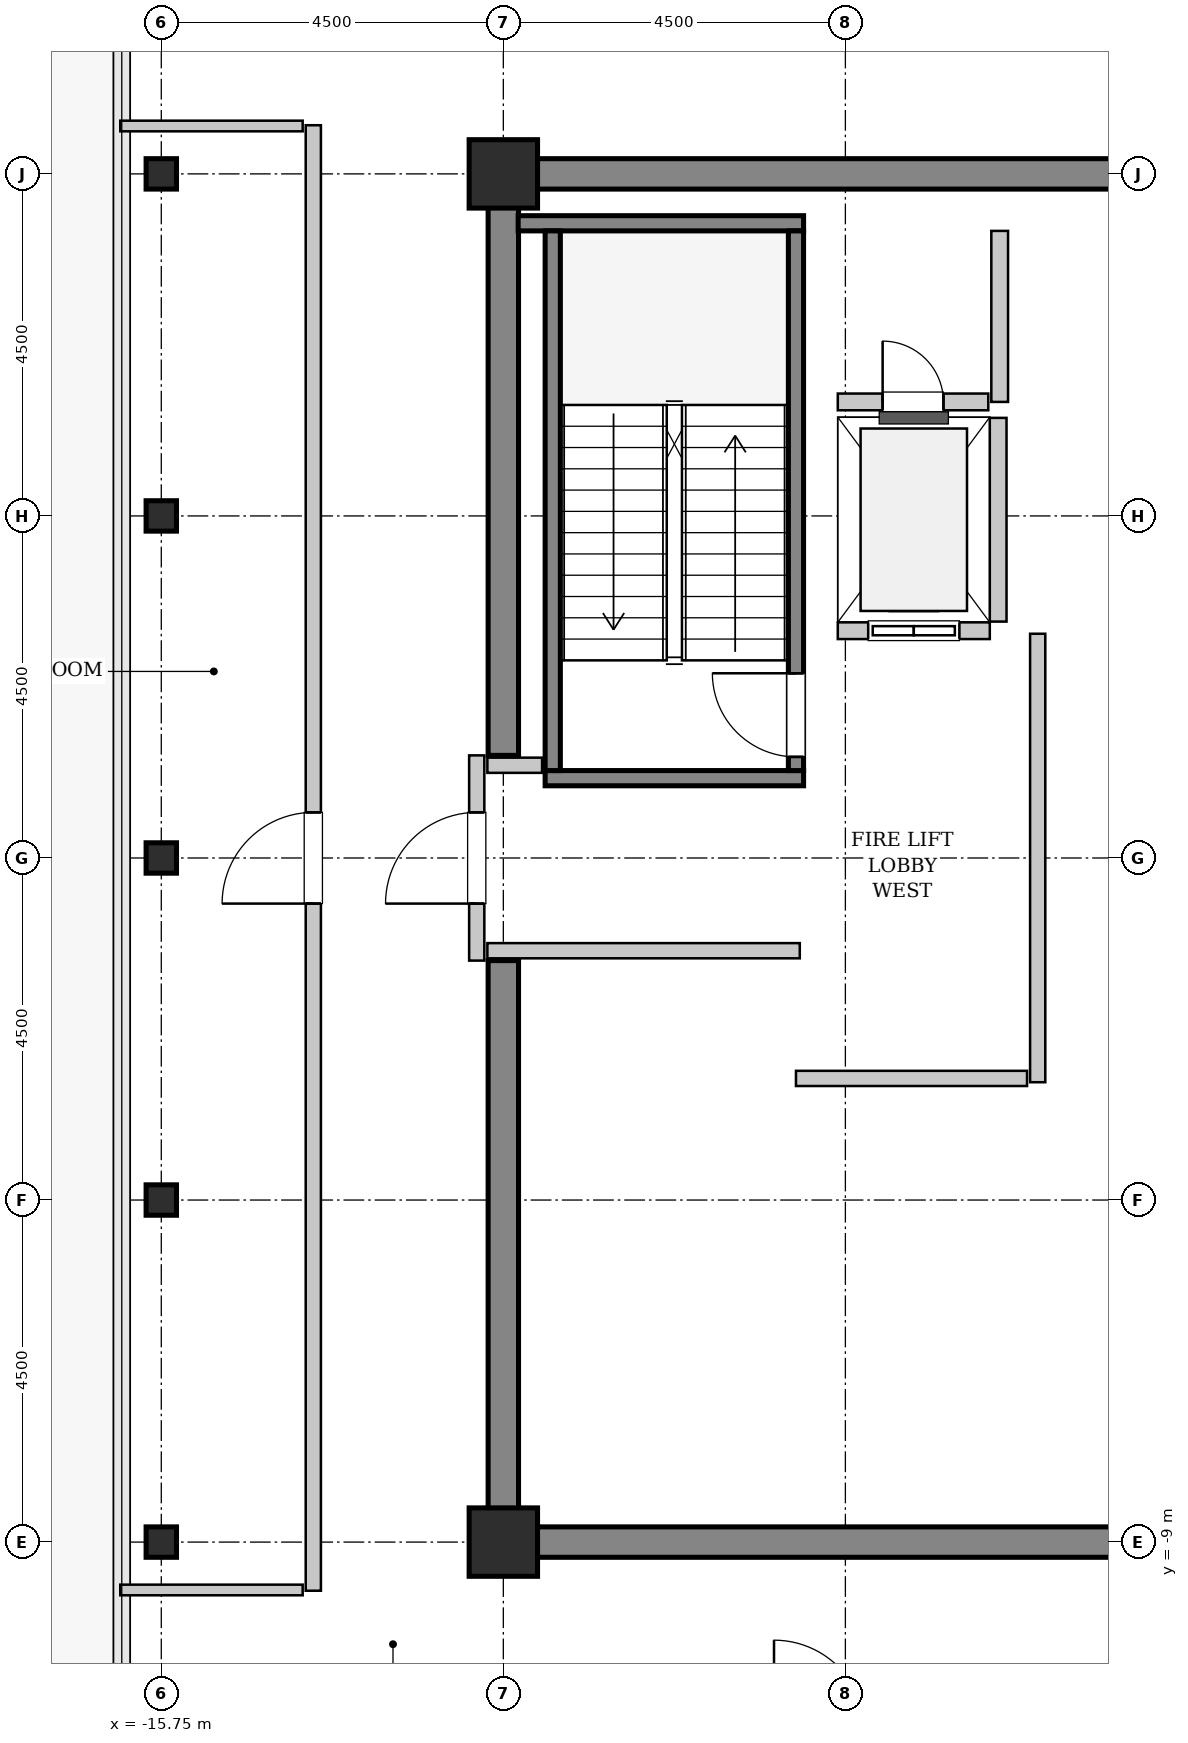
"""IFC4 building model, lengths in metres.
Left out: names, types, materials, properties, quantities, classifications, styles, units other than length and angle.
Written with IfcOpenShell. Run it as: python <this file> out.ifc"""

import sys

from ifc_helpers import new_model, si_unit, direction, frame, frame_2d, origin, origin_2d, place, context, subcontext, project, spatial, rectangle, hollow_rectangle, extrude, source, transform, mapped, element, fill, save


model = new_model("IFC4")
c1 = context("Model", 3, precision=1e-05, world=origin(), true_north=direction((0.0, 1.0)))
c2 = subcontext(c1, "Body", "Model", "MODEL_VIEW")
j1 = project(units=[si_unit("LENGTHUNIT", "METRE"), si_unit("PLANEANGLEUNIT", "RADIAN")], contexts=[c1])
p1 = place(None, origin())
s1 = spatial("IfcSite", under=j1, at=p1, CompositionType="ELEMENT")
p2 = place(p1, origin())
s2 = spatial("IfcBuilding", under=s1, at=p2, CompositionType="ELEMENT")
p3 = place(p2, frame((0.0, 0.0, 358.6)))
s3 = spatial("IfcBuildingStorey", under=s2, at=p3, CompositionType="ELEMENT", Elevation=358.6)
m1 = source(origin(), c2, "Body", "SweptSolid", [
    extrude(rectangle(XDim=9.9, YDim=0.4, at=frame_2d((4.95, 0.0))), origin(), (0.0, 0.0, 1.0), 4.4),
])
for number, where, z_axis, x_axis in (
    (1, (-11.45, 9.0, 0.0), (0.0, 0.0, 1.0), (1.0, 0.0, 0.0)),
    (2, (-11.45, -9.0, 0.0), (0.0, 0.0, 1.0), (1.0, 0.0, 0.0)),
):
    element("IfcWall", number, at=place(p3, frame(where, z_axis=z_axis, x_axis=x_axis)), inside=s3, PredefinedType="SHEAR", context=c2, shape_type="MappedRepresentation", body=[
        mapped(m1, transform((0.0, 0.0, 0.0), x_axis=(1.0, 0.0, 0.0), y_axis=(0.0, 1.0, 0.0), z_axis=(0.0, 0.0, 1.0), scale=1.0)),
    ])
m2 = source(origin(), c2, "Body", "SweptSolid", [
    extrude(rectangle(XDim=7.45, YDim=0.4, at=frame_2d((3.725, 0.0))), origin(), (0.0, 0.0, 1.0), 4.4),
])
for number, where, z_axis, x_axis in (
    (3, (-11.25, -8.8, 0.0), (0.0, 0.0, 1.0), (0.0, 1.0, 0.0)),
    (4, (-11.25, 1.35, 0.0), (0.0, 0.0, 1.0), (0.0, 1.0, 0.0)),
):
    element("IfcWall", number, at=place(p3, frame(where, z_axis=z_axis, x_axis=x_axis)), inside=s3, PredefinedType="SHEAR", context=c2, shape_type="MappedRepresentation", body=[
        mapped(m2, transform((0.0, 0.0, 0.0), x_axis=(1.0, 0.0, 0.0), y_axis=(0.0, 1.0, 0.0), z_axis=(0.0, 0.0, 1.0), scale=1.0)),
    ])
m3 = source(origin(), c2, "Body", "SweptSolid", [
    extrude(hollow_rectangle(XDim=0.4, YDim=0.4, WallThickness=0.02, InnerFilletRadius=0.02, OuterFilletRadius=0.04, at=origin_2d()), origin(), (0.0, 0.0, 1.0), 4.4),
])
for number, where, z_axis, x_axis in (
    (5, (-15.75, -9.0, 0.0), (0.0, 0.0, 1.0), (1.0, 0.0, 0.0)),
    (6, (-15.75, -4.5, 0.0), (0.0, 0.0, 1.0), (1.0, 0.0, 0.0)),
    (7, (-15.75, 0.0, 0.0), (0.0, 0.0, 1.0), (1.0, 0.0, 0.0)),
    (8, (-15.75, 4.5, 0.0), (0.0, 0.0, 1.0), (1.0, 0.0, 0.0)),
    (9, (-15.75, 9.0, 0.0), (0.0, 0.0, 1.0), (1.0, 0.0, 0.0)),
):
    element("IfcColumn", number, at=place(p3, frame(where, z_axis=z_axis, x_axis=x_axis)), inside=s3, PredefinedType="COLUMN", context=c2, shape_type="MappedRepresentation", body=[
        mapped(m3, transform((0.0, 0.0, 0.0), x_axis=(1.0, 0.0, 0.0), y_axis=(0.0, 1.0, 0.0), z_axis=(0.0, 0.0, 1.0), scale=1.0)),
    ])
m4 = source(origin(), c2, "Body", "SweptSolid", [
    extrude(rectangle(XDim=0.9, YDim=0.9, at=origin_2d()), origin(), (0.0, 0.0, 1.0), 4.4),
])
for number, where, z_axis, x_axis in (
    (10, (-11.25, -9.0, 0.0), (0.0, 0.0, 1.0), (1.0, 0.0, 0.0)),
    (11, (-11.25, 9.0, 0.0), (0.0, 0.0, 1.0), (1.0, 0.0, 0.0)),
):
    element("IfcColumn", number, at=place(p3, frame(where, z_axis=z_axis, x_axis=x_axis)), inside=s3, PredefinedType="COLUMN", context=c2, shape_type="MappedRepresentation", body=[
        mapped(m4, transform((0.0, 0.0, 0.0), x_axis=(1.0, 0.0, 0.0), y_axis=(0.0, 1.0, 0.0), z_axis=(0.0, 0.0, 1.0), scale=1.0)),
    ])
m5 = source(origin(), c2, "Body", "SweptSolid", [
    extrude(rectangle(XDim=3.4, YDim=0.2, at=frame_2d((1.7, 0.0))), origin(), (0.0, 0.0, 1.0), 4.4),
])
p4 = place(p3, frame((-7.3, 1.05, 0.0), z_axis=(0.0, 0.0, 1.0), x_axis=(-1.0, 0.0, 0.0)))
e12 = element("IfcWall", 12, at=p4, inside=s3, PredefinedType="SOLIDWALL", context=c2, shape_type="MappedRepresentation", body=[
    mapped(m5, transform((0.0, 0.0, 0.0), x_axis=(1.0, 0.0, 0.0), y_axis=(0.0, 1.0, 0.0), z_axis=(0.0, 0.0, 1.0), scale=1.0)),
])
m6 = source(origin(), c2, "Body", "SweptSolid", [
    extrude(rectangle(XDim=3.755, YDim=0.2, at=frame_2d((1.877, 0.0))), origin(), (0.0, 0.0, 1.0), 4.4),
])
p5 = place(p3, frame((-7.3, 8.35, 0.0), z_axis=(0.0, 0.0, 1.0), x_axis=(-1.0, 0.0, 0.0)))
e13 = element("IfcWall", 13, at=p5, inside=s3, PredefinedType="SOLIDWALL", context=c2, shape_type="MappedRepresentation", body=[
    mapped(m6, transform((0.0, 0.0, 0.0), x_axis=(1.0, 0.0, 0.0), y_axis=(0.0, 1.0, 0.0), z_axis=(0.0, 0.0, 1.0), scale=1.0)),
])
m7 = source(origin(), c2, "Body", "SweptSolid", [
    extrude(rectangle(XDim=7.1, YDim=0.2, at=frame_2d((3.55, 0.0))), origin(), (0.0, 0.0, 1.0), 4.4),
])
p6 = place(p3, frame((-7.4, 1.15, 0.0), z_axis=(0.0, 0.0, 1.0), x_axis=(0.0, 1.0, 0.0)))
e14 = element("IfcWall", 14, at=p6, inside=s3, PredefinedType="SOLIDWALL", context=c2, shape_type="MappedRepresentation", body=[
    mapped(m7, transform((0.0, 0.0, 0.0), x_axis=(1.0, 0.0, 0.0), y_axis=(0.0, 1.0, 0.0), z_axis=(0.0, 0.0, 1.0), scale=1.0)),
])
p7 = place(p6, frame((0.18, 0.0, 0.0)))
e15 = element("IfcOpeningElement", 15, at=p7, cuts=e14, PredefinedType="OPENING", context=c2, shape_type="SweptSolid", body=[
    extrude(rectangle(XDim=1.1, YDim=2.15, at=frame_2d((0.55, 1.075))), frame((0.0, 0.11, 0.0), z_axis=(0.0, -1.0, 0.0), x_axis=(1.0, 0.0, 0.0)), (0.0, 0.0, 1.0), 0.22),
])
p8 = place(p3, frame((-10.6, 1.15, 0.0), z_axis=(0.0, 0.0, 1.0), x_axis=(0.0, 1.0, 0.0)))
e16 = element("IfcWall", 16, at=p8, inside=s3, PredefinedType="SOLIDWALL", context=c2, shape_type="MappedRepresentation", body=[
    mapped(m7, transform((0.0, 0.0, 0.0), x_axis=(1.0, 0.0, 0.0), y_axis=(0.0, 1.0, 0.0), z_axis=(0.0, 0.0, 1.0), scale=1.0)),
])
m8 = source(origin(), c2, "Body", "SweptSolid", [
    extrude(rectangle(XDim=2.0, YDim=0.22, at=frame_2d((1.0, 0.0))), origin(), (0.0, 0.0, 1.0), 4.085),
])
p9 = place(p3, frame((-6.85, 2.99, 0.0), z_axis=(0.0, 0.0, 1.0), x_axis=(1.0, 0.0, 0.0)))
e17 = element("IfcWall", 17, at=p9, inside=s3, PredefinedType="SOLIDWALL", context=c2, shape_type="MappedRepresentation", body=[
    mapped(m8, transform((0.0, 0.0, 0.0), x_axis=(1.0, 0.0, 0.0), y_axis=(0.0, 1.0, 0.0), z_axis=(0.0, 0.0, 1.0), scale=1.0)),
])
p10 = place(p9, frame((0.4, 0.0, 0.0)))
e18 = element("IfcOpeningElement", 18, at=p10, cuts=e17, PredefinedType="OPENING", context=c2, shape_type="SweptSolid", body=[
    extrude(rectangle(XDim=1.2, YDim=2.2, at=frame_2d((0.6, 1.1))), frame((0.0, 0.12, 0.0), z_axis=(0.0, -1.0, 0.0), x_axis=(1.0, 0.0, 0.0)), (0.0, 0.0, 1.0), 0.24),
])
m9 = source(origin(), c2, "Body", "SweptSolid", [
    extrude(rectangle(XDim=2.68, YDim=0.22, at=frame_2d((1.34, 0.0))), origin(), (0.0, 0.0, 1.0), 4.085),
])
p11 = place(p3, frame((-4.74, 3.11, 0.0), z_axis=(0.0, 0.0, 1.0), x_axis=(0.0, 1.0, 0.0)))
e19 = element("IfcWall", 19, at=p11, inside=s3, PredefinedType="SOLIDWALL", context=c2, shape_type="MappedRepresentation", body=[
    mapped(m9, transform((0.0, 0.0, 0.0), x_axis=(1.0, 0.0, 0.0), y_axis=(0.0, 1.0, 0.0), z_axis=(0.0, 0.0, 1.0), scale=1.0)),
])
m10 = source(origin(), c2, "Body", "SweptSolid", [
    extrude(rectangle(XDim=2.25, YDim=0.22, at=frame_2d((1.125, 0.0))), origin(), (0.0, 0.0, 1.0), 4.085),
])
p12 = place(p3, frame((-4.72, 6.0, 0.0), z_axis=(0.0, 0.0, 1.0), x_axis=(0.0, 1.0, 0.0)))
e20 = element("IfcWall", 20, at=p12, inside=s3, PredefinedType="SOLIDWALL", context=c2, shape_type="MappedRepresentation", body=[
    mapped(m10, transform((0.0, 0.0, 0.0), x_axis=(1.0, 0.0, 0.0), y_axis=(0.0, 1.0, 0.0), z_axis=(0.0, 0.0, 1.0), scale=1.0)),
])
m11 = source(origin(), c2, "Body", "SweptSolid", [
    extrude(rectangle(XDim=1.98, YDim=0.22, at=frame_2d((0.99, 0.0))), origin(), (0.0, 0.0, 1.0), 4.085),
])
p13 = place(p3, frame((-6.85, 6.0, 0.0), z_axis=(0.0, 0.0, 1.0), x_axis=(1.0, 0.0, 0.0)))
e21 = element("IfcWall", 21, at=p13, inside=s3, PredefinedType="SOLIDWALL", context=c2, shape_type="MappedRepresentation", body=[
    mapped(m11, transform((0.0, 0.0, 0.0), x_axis=(1.0, 0.0, 0.0), y_axis=(0.0, 1.0, 0.0), z_axis=(0.0, 0.0, 1.0), scale=1.0)),
])
p14 = place(p13, frame((0.59, 0.0, 0.0)))
e22 = element("IfcOpeningElement", 22, at=p14, cuts=e21, PredefinedType="OPENING", context=c2, shape_type="SweptSolid", body=[
    extrude(rectangle(XDim=0.8, YDim=2.0, at=frame_2d((0.4, 1.0))), frame((0.0, 0.12, 0.0), z_axis=(0.0, -1.0, 0.0), x_axis=(1.0, 0.0, 0.0)), (0.0, 0.0, 1.0), 0.24),
])
m12 = source(origin(), c2, "Body", "SweptSolid", [
    extrude(rectangle(XDim=2.7, YDim=0.2, at=frame_2d((1.35, 0.0))), origin(), (0.0, 0.0, 1.0), 3.175),
])
p15 = place(p3, frame((-11.6, -1.35, 0.0), z_axis=(0.0, 0.0, 1.0), x_axis=(0.0, 1.0, 0.0)))
e23 = element("IfcWall", 23, at=p15, inside=s3, PredefinedType="PARTITIONING", context=c2, shape_type="MappedRepresentation", body=[
    mapped(m12, transform((0.0, 0.0, 0.0), x_axis=(1.0, 0.0, 0.0), y_axis=(0.0, 1.0, 0.0), z_axis=(0.0, 0.0, 1.0), scale=1.0)),
])
p16 = place(p15, frame((0.75, 0.0, 0.0)))
e24 = element("IfcOpeningElement", 24, at=p16, cuts=e23, PredefinedType="OPENING", context=c2, shape_type="SweptSolid", body=[
    extrude(rectangle(XDim=1.2, YDim=2.15, at=frame_2d((0.6, 1.075))), frame((0.0, 0.11, 0.0), z_axis=(0.0, -1.0, 0.0), x_axis=(1.0, 0.0, 0.0)), (0.0, 0.0, 1.0), 0.22),
])
m13 = source(origin(), c2, "Body", "SweptSolid", [
    extrude(rectangle(XDim=5.9, YDim=0.2, at=frame_2d((2.95, 0.0))), origin(), (0.0, 0.0, 1.0), 4.085),
])
p17 = place(p3, frame((-4.22, -2.95, 0.0), z_axis=(0.0, 0.0, 1.0), x_axis=(0.0, 1.0, 0.0)))
e25 = element("IfcWall", 25, at=p17, inside=s3, PredefinedType="PARTITIONING", context=c2, shape_type="MappedRepresentation", body=[
    mapped(m13, transform((0.0, 0.0, 0.0), x_axis=(1.0, 0.0, 0.0), y_axis=(0.0, 1.0, 0.0), z_axis=(0.0, 0.0, 1.0), scale=1.0)),
])
m14 = source(origin(), c2, "Body", "SweptSolid", [
    extrude(rectangle(XDim=3.04, YDim=0.2, at=frame_2d((1.52, 0.0))), origin(), (0.0, 0.0, 1.0), 4.085),
])
p18 = place(p3, frame((-7.4, -2.9, 0.0), z_axis=(0.0, 0.0, 1.0), x_axis=(1.0, 0.0, 0.0)))
e26 = element("IfcWall", 26, at=p18, inside=s3, PredefinedType="PARTITIONING", context=c2, shape_type="MappedRepresentation", body=[
    mapped(m14, transform((0.0, 0.0, 0.0), x_axis=(1.0, 0.0, 0.0), y_axis=(0.0, 1.0, 0.0), z_axis=(0.0, 0.0, 1.0), scale=1.0)),
])
m15 = source(origin(), c2, "Body", "SweptSolid", [
    extrude(rectangle(XDim=0.72, YDim=0.2, at=frame_2d((0.36, 0.0))), origin(), (0.0, 0.0, 1.0), 4.085),
])
p19 = place(p3, frame((-11.46, 1.22, 0.0), z_axis=(0.0, 0.0, 1.0), x_axis=(1.0, 0.0, 0.0)))
e27 = element("IfcWall", 27, at=p19, inside=s3, PredefinedType="PARTITIONING", context=c2, shape_type="MappedRepresentation", body=[
    mapped(m15, transform((0.0, 0.0, 0.0), x_axis=(1.0, 0.0, 0.0), y_axis=(0.0, 1.0, 0.0), z_axis=(0.0, 0.0, 1.0), scale=1.0)),
])
m16 = source(origin(), c2, "Body", "SweptSolid", [
    extrude(rectangle(XDim=4.11, YDim=0.2, at=frame_2d((2.055, 0.0))), origin(), (0.0, 0.0, 1.0), 4.085),
])
p20 = place(p3, frame((-11.46, -1.22, 0.0), z_axis=(0.0, 0.0, 1.0), x_axis=(1.0, 0.0, 0.0)))
e28 = element("IfcWall", 28, at=p20, inside=s3, PredefinedType="PARTITIONING", context=c2, shape_type="MappedRepresentation", body=[
    mapped(m16, transform((0.0, 0.0, 0.0), x_axis=(1.0, 0.0, 0.0), y_axis=(0.0, 1.0, 0.0), z_axis=(0.0, 0.0, 1.0), scale=1.0)),
])
m17 = source(origin(), c2, "Body", "SweptSolid", [
    extrude(rectangle(XDim=19.28, YDim=0.2, at=frame_2d((9.64, 0.0))), origin(), (0.0, 0.0, 1.0), 4.085),
])
p21 = place(p3, frame((-13.75, -9.64, 0.0), z_axis=(0.0, 0.0, 1.0), x_axis=(0.0, 1.0, 0.0)))
e29 = element("IfcWall", 29, at=p21, inside=s3, PredefinedType="SOLIDWALL", context=c2, shape_type="MappedRepresentation", body=[
    mapped(m17, transform((0.0, 0.0, 0.0), x_axis=(1.0, 0.0, 0.0), y_axis=(0.0, 1.0, 0.0), z_axis=(0.0, 0.0, 1.0), scale=1.0)),
])
p22 = place(p21, frame((9.04, 0.0, 0.0)))
e30 = element("IfcOpeningElement", 30, at=p22, cuts=e29, PredefinedType="OPENING", context=c2, shape_type="SweptSolid", body=[
    extrude(rectangle(XDim=1.2, YDim=2.15, at=frame_2d((0.6, 1.075))), frame((0.0, 0.11, 0.0), z_axis=(0.0, -1.0, 0.0), x_axis=(1.0, 0.0, 0.0)), (0.0, 0.0, 1.0), 0.22),
])
m18 = source(origin(), c2, "Body", "SweptSolid", [
    extrude(rectangle(XDim=2.4, YDim=0.14, at=frame_2d((1.2, 0.0))), origin(), (0.0, 0.0, 1.0), 4.085),
])
for number, where, z_axis, x_axis in (
    (31, (-16.29, -9.63, 0.0), (0.0, 0.0, 1.0), (1.0, 0.0, 0.0)),
    (32, (-16.29, 9.63, 0.0), (0.0, 0.0, 1.0), (1.0, 0.0, 0.0)),
):
    element("IfcWall", number, at=place(p3, frame(where, z_axis=z_axis, x_axis=x_axis)), inside=s3, PredefinedType="PARTITIONING", context=c2, shape_type="MappedRepresentation", body=[
        mapped(m18, transform((0.0, 0.0, 0.0), x_axis=(1.0, 0.0, 0.0), y_axis=(0.0, 1.0, 0.0), z_axis=(0.0, 0.0, 1.0), scale=1.0)),
    ])
m19 = source(origin(), c2, "Body", "SweptSolid", [
    extrude(rectangle(XDim=1.1, YDim=2.15, at=frame_2d((0.55, 1.075))), frame((0.0, 0.025, 0.0), z_axis=(0.0, -1.0, 0.0), x_axis=(1.0, 0.0, 0.0)), (0.0, 0.0, 1.0), 0.05),
])
p23 = place(p7, origin())
e33 = element("IfcDoor", 33, at=p23, inside=s3, OperationType="SINGLE_SWING_RIGHT", PredefinedType="DOOR", context=c2, shape_type="MappedRepresentation", body=[
    mapped(m19, transform((0.0, 0.0, 0.0), x_axis=(1.0, 0.0, 0.0), y_axis=(0.0, 1.0, 0.0), z_axis=(0.0, 0.0, 1.0), scale=1.0)),
])
fill(e15, e33)
m20 = source(origin(), c2, "Body", "SweptSolid", [
    extrude(rectangle(XDim=1.2, YDim=2.2, at=frame_2d((0.6, 1.1))), frame((0.0, 0.025, 0.0), z_axis=(0.0, -1.0, 0.0), x_axis=(1.0, 0.0, 0.0)), (0.0, 0.0, 1.0), 0.05),
])
p24 = place(p10, origin())
e34 = element("IfcDoor", 34, at=p24, inside=s3, OperationType="SLIDING_TO_LEFT", PredefinedType="DOOR", context=c2, shape_type="MappedRepresentation", body=[
    mapped(m20, transform((0.0, 0.0, 0.0), x_axis=(1.0, 0.0, 0.0), y_axis=(0.0, 1.0, 0.0), z_axis=(0.0, 0.0, 1.0), scale=1.0)),
])
fill(e18, e34)
m21 = source(origin(), c2, "Body", "SweptSolid", [
    extrude(rectangle(XDim=0.8, YDim=2.0, at=frame_2d((0.4, 1.0))), frame((0.0, 0.025, 0.0), z_axis=(0.0, -1.0, 0.0), x_axis=(1.0, 0.0, 0.0)), (0.0, 0.0, 1.0), 0.05),
])
p25 = place(p14, origin())
e35 = element("IfcDoor", 35, at=p25, inside=s3, OperationType="SINGLE_SWING_LEFT", PredefinedType="TRAPDOOR", context=c2, shape_type="MappedRepresentation", body=[
    mapped(m21, transform((0.0, 0.0, 0.0), x_axis=(1.0, 0.0, 0.0), y_axis=(0.0, 1.0, 0.0), z_axis=(0.0, 0.0, 1.0), scale=1.0)),
])
fill(e22, e35)
m22 = source(origin(), c2, "Body", "SweptSolid", [
    extrude(rectangle(XDim=1.2, YDim=2.15, at=frame_2d((0.6, 1.075))), frame((0.0, 0.025, 0.0), z_axis=(0.0, -1.0, 0.0), x_axis=(1.0, 0.0, 0.0)), (0.0, 0.0, 1.0), 0.05),
])
p26 = place(p16, origin())
e36 = element("IfcDoor", 36, at=p26, inside=s3, OperationType="SINGLE_SWING_LEFT", PredefinedType="DOOR", context=c2, shape_type="MappedRepresentation", body=[
    mapped(m22, transform((0.0, 0.0, 0.0), x_axis=(1.0, 0.0, 0.0), y_axis=(0.0, 1.0, 0.0), z_axis=(0.0, 0.0, 1.0), scale=1.0)),
])
fill(e24, e36)
p27 = place(p22, origin())
e37 = element("IfcDoor", 37, at=p27, inside=s3, OperationType="SINGLE_SWING_LEFT", PredefinedType="DOOR", context=c2, shape_type="MappedRepresentation", body=[
    mapped(m22, transform((0.0, 0.0, 0.0), x_axis=(1.0, 0.0, 0.0), y_axis=(0.0, 1.0, 0.0), z_axis=(0.0, 0.0, 1.0), scale=1.0)),
])
fill(e30, e37)
save(model, sys.argv[1])
